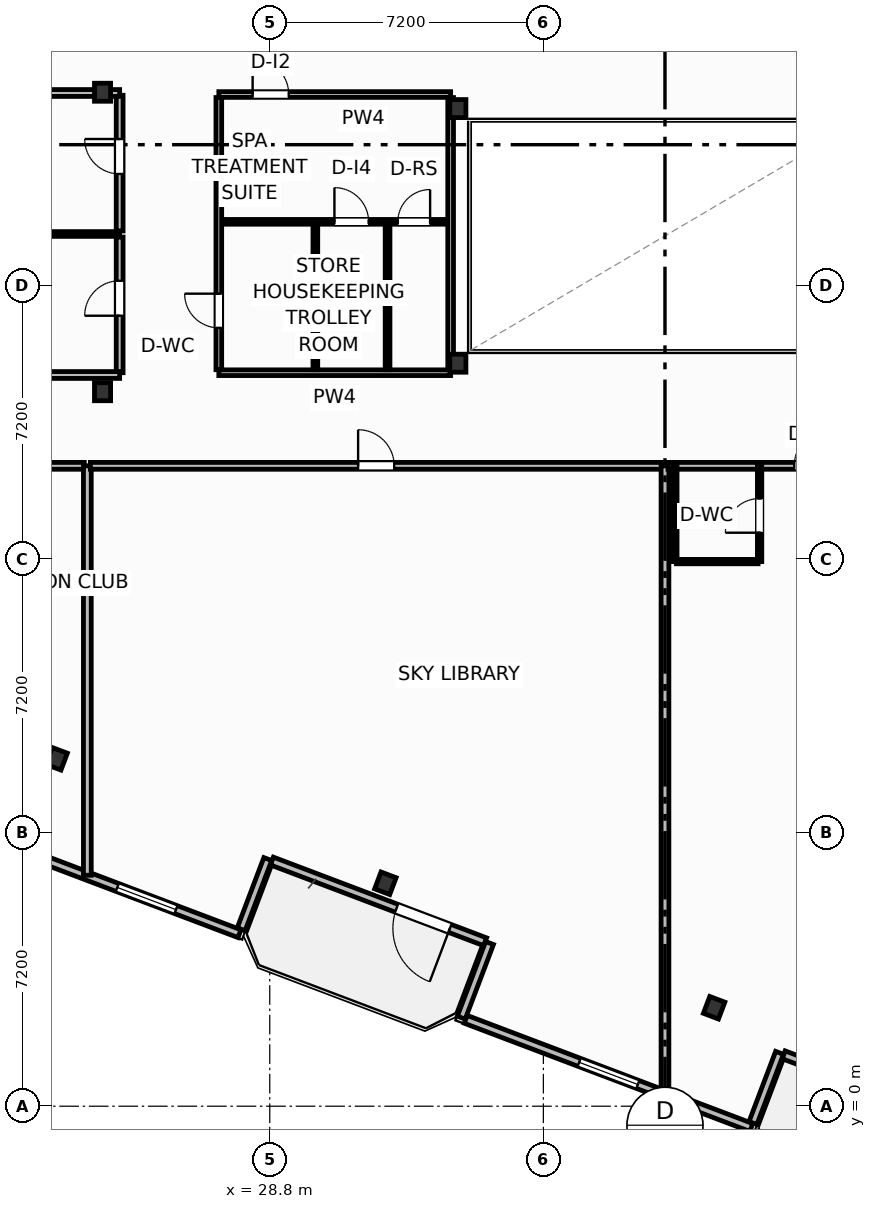
"""IFC4 building model, lengths in metres.
Left out: names, types, materials, properties, quantities, classifications, styles, units other than length and angle.
Written with IfcOpenShell. Run it as: python <this file> out.ifc"""

import sys

from ifc_helpers import new_model, si_unit, direction, frame, frame_2d, origin, origin_2d, place, context, subcontext, project, spatial, rectangle, i_section, extrude, element, fill, save


model = new_model("IFC4")
c1 = context("Model", 3, precision=1e-05, world=origin(), true_north=direction((0.0, 1.0)))
c2 = subcontext(c1, "Body", "Model", "MODEL_VIEW")
j1 = project(units=[si_unit("LENGTHUNIT", "METRE"), si_unit("PLANEANGLEUNIT", "RADIAN")], contexts=[c1])
p1 = place(None, origin())
s1 = spatial("IfcSite", under=j1, at=p1, CompositionType="ELEMENT")
p2 = place(p1, origin())
s2 = spatial("IfcBuilding", under=s1, at=p2, CompositionType="ELEMENT")
p3 = place(p2, frame((0.0, 0.0, 98.4)))
s3 = spatial("IfcBuildingStorey", under=s2, at=p3, CompositionType="ELEMENT", Elevation=98.4)
for number, where, z_axis, x_axis in (
    (1, (33.75, 19.55, 0.0), (0.0, 0.0, 1.0), (1.0, 0.0, 0.0)),
    (2, (33.75, 26.25, 0.0), (0.0, 0.0, 1.0), (1.0, 0.0, 0.0)),
    (3, (24.4, 18.8, 0.0), (0.0, 0.0, 1.0), (1.0, 0.0, 0.0)),
    (4, (24.4, 26.68, 0.0), (0.0, 0.0, 1.0), (1.0, 0.0, 0.0)),
    (5, (23.192, 9.141, 0.0), (0.0, 0.0, 1.0), (0.935, -0.354, 0.0)),
    (6, (31.843, 5.866, 0.0), (0.0, 0.0, 1.0), (0.935, -0.354, 0.0)),
    (7, (40.493, 2.591, 0.0), (0.0, 0.0, 1.0), (0.935, -0.354, 0.0)),
):
    element("IfcColumn", number, at=place(p3, frame(where, z_axis=z_axis, x_axis=x_axis)), inside=s3, PredefinedType="COLUMN", context=c2, shape_type="SweptSolid", body=[
        extrude(i_section(OverallWidth=0.424, OverallDepth=0.474, WebThickness=0.048, FlangeThickness=0.077, FilletRadius=0.025, at=origin_2d()), origin(), (0.0, 0.0, 1.0), 3.7),
    ])
p4 = place(p3, frame((34.468, 4.327, 0.0), z_axis=(0.0, 0.0, 1.0), x_axis=(-0.9352192676, 0.354069091436, 0.0)))
e8 = element("IfcWall", 8, at=p4, inside=s3, PredefinedType="SOLIDWALL", context=c2, shape_type="SweptSolid", body=[
    extrude(rectangle(XDim=6.0, YDim=0.22, at=frame_2d((3.0, 0.0))), origin(), (0.0, 0.0, 1.0), 2.73),
])
p5 = place(p4, frame((0.992, 0.0, 0.0)))
e9 = element("IfcOpeningElement", 9, at=p5, cuts=e8, PredefinedType="OPENING", context=c2, shape_type="SweptSolid", body=[
    extrude(rectangle(XDim=1.5, YDim=2.25, at=frame_2d((0.75, 1.125))), frame((0.0, 0.12, 0.0), z_axis=(0.0, -1.0, 0.0), x_axis=(1.0, 0.0, 0.0)), (0.0, 0.0, 1.0), 0.24),
])
p6 = place(p3, frame((47.935, -0.771, 0.0), z_axis=(0.0, 0.0, 1.0), x_axis=(-0.935227640088, 0.354046976001, 0.0)))
e10 = element("IfcWall", 10, at=p6, inside=s3, PredefinedType="SOLIDWALL", context=c2, shape_type="SweptSolid", body=[
    extrude(rectangle(XDim=6.0, YDim=0.22, at=frame_2d((3.0, 0.0))), origin(), (0.0, 0.0, 1.0), 2.73),
])
p7 = place(p6, frame((2.176, 0.0, 0.0)))
e11 = element("IfcOpeningElement", 11, at=p7, cuts=e10, PredefinedType="OPENING", context=c2, shape_type="SweptSolid", body=[
    extrude(rectangle(XDim=1.5, YDim=2.25, at=frame_2d((0.75, 1.125))), frame((0.0, 0.12, 0.0), z_axis=(0.0, -1.0, 0.0), x_axis=(1.0, 0.0, 0.0)), (0.0, 0.0, 1.0), 0.24),
])
p8 = place(p3, frame((20.49, 7.384, 0.0), z_axis=(0.0, 0.0, 1.0), x_axis=(0.935230796934, -0.354038636968, 0.0)))
e12 = element("IfcWall", 12, at=p8, inside=s3, PredefinedType="SOLIDWALL", context=c2, shape_type="SweptSolid", body=[
    extrude(rectangle(XDim=8.035, YDim=0.22, at=frame_2d((4.018, 0.0))), origin(), (0.0, 0.0, 1.0), 2.73),
])
p9 = place(p8, frame((4.597, 0.0, 0.8)))
e13 = element("IfcOpeningElement", 13, at=p9, cuts=e12, PredefinedType="OPENING", context=c2, shape_type="SweptSolid", body=[
    extrude(rectangle(XDim=1.65, YDim=1.65, at=frame_2d((0.825, 0.825))), frame((0.0, 0.12, 0.0), z_axis=(0.0, -1.0, 0.0), x_axis=(1.0, 0.0, 0.0)), (0.0, 0.0, 1.0), 0.24),
])
p10 = place(p3, frame((28.048, 4.656, 0.0), z_axis=(0.0, 0.0, 1.0), x_axis=(0.354128791944, 0.935196663123, 0.0)))
e14 = element("IfcWall", 14, at=p10, inside=s3, PredefinedType="SOLIDWALL", context=c2, shape_type="SweptSolid", body=[
    extrude(rectangle(XDim=1.975, YDim=0.22, at=frame_2d((0.988, 0.0))), origin(), (0.0, 0.0, 1.0), 2.73),
])
p11 = place(p3, frame((34.583, 4.294, 0.0), z_axis=(0.0, 0.0, 1.0), x_axis=(-0.354128469405, -0.935196785258, 0.0)))
e15 = element("IfcWall", 15, at=p11, inside=s3, PredefinedType="SOLIDWALL", context=c2, shape_type="SweptSolid", body=[
    extrude(rectangle(XDim=2.1, YDim=0.22, at=frame_2d((1.05, 0.0))), origin(), (0.0, 0.0, 1.0), 2.73),
])
p12 = place(p3, frame((33.957, 2.286, 0.0), z_axis=(0.0, 0.0, 1.0), x_axis=(0.935220736163, -0.354065212427, 0.0)))
e16 = element("IfcWall", 16, at=p12, inside=s3, PredefinedType="SOLIDWALL", context=c2, shape_type="SweptSolid", body=[
    extrude(rectangle(XDim=8.035, YDim=0.22, at=frame_2d((4.018, 0.0))), origin(), (0.0, 0.0, 1.0), 2.73),
])
p13 = place(p12, frame((3.192, 0.0, 0.8)))
e17 = element("IfcOpeningElement", 17, at=p13, cuts=e16, PredefinedType="OPENING", context=c2, shape_type="SweptSolid", body=[
    extrude(rectangle(XDim=1.65, YDim=1.65, at=frame_2d((0.825, 0.825))), frame((0.0, 0.12, 0.0), z_axis=(0.0, -1.0, 0.0), x_axis=(1.0, 0.0, 0.0)), (0.0, 0.0, 1.0), 0.24),
])
p14 = place(p3, frame((41.516, -0.442, 0.0), z_axis=(0.0, 0.0, 1.0), x_axis=(0.354061611705, 0.935222099352, 0.0)))
e18 = element("IfcWall", 18, at=p14, inside=s3, PredefinedType="SOLIDWALL", context=c2, shape_type="SweptSolid", body=[
    extrude(rectangle(XDim=1.975, YDim=0.22, at=frame_2d((0.987, 0.0))), origin(), (0.0, 0.0, 1.0), 2.73),
])
p15 = place(p3, frame((1.58, 16.85, 0.0), z_axis=(0.0, 0.0, 1.0), x_axis=(1.0, 0.0, 0.0)))
e19 = element("IfcWall", 19, at=p15, inside=s3, PredefinedType="PARTITIONING", context=c2, shape_type="SweptSolid", body=[
    extrude(rectangle(XDim=22.34, YDim=0.18, at=frame_2d((11.17, 0.0))), origin(), (0.0, 0.0, 1.0), 3.45),
])
p16 = place(p15, frame((14.895, 0.0, 0.0)))
e20 = element("IfcOpeningElement", 20, at=p16, cuts=e19, PredefinedType="OPENING", context=c2, shape_type="SweptSolid", body=[
    extrude(rectangle(XDim=0.95, YDim=2.05, at=frame_2d((0.475, 1.025))), frame((0.0, 0.1, 0.0), z_axis=(0.0, -1.0, 0.0), x_axis=(1.0, 0.0, 0.0)), (0.0, 0.0, 1.0), 0.2),
])
p17 = place(p3, frame((24.0, 6.076, 0.0), z_axis=(0.0, 0.0, 1.0), x_axis=(0.0, 1.0, 0.0)))
e21 = element("IfcWall", 21, at=p17, inside=s3, PredefinedType="PARTITIONING", context=c2, shape_type="SweptSolid", body=[
    extrude(rectangle(XDim=10.774, YDim=0.205, at=frame_2d((5.387, 0.0))), origin(), (0.0, 0.0, 1.0), 2.58),
])
p18 = place(p3, frame((24.08, 16.85, 0.0), z_axis=(0.0, 0.0, 1.0), x_axis=(1.0, 0.0, 0.0)))
e22 = element("IfcWall", 22, at=p18, inside=s3, PredefinedType="PARTITIONING", context=c2, shape_type="SweptSolid", body=[
    extrude(rectangle(XDim=15.04, YDim=0.18, at=frame_2d((7.52, 0.0))), origin(), (0.0, 0.0, 1.0), 3.45),
])
p19 = place(p18, frame((7.045, 0.0, 0.0)))
e23 = element("IfcOpeningElement", 23, at=p19, cuts=e22, PredefinedType="OPENING", context=c2, shape_type="SweptSolid", body=[
    extrude(rectangle(XDim=0.95, YDim=2.05, at=frame_2d((0.475, 1.025))), frame((0.0, 0.1, 0.0), z_axis=(0.0, -1.0, 0.0), x_axis=(1.0, 0.0, 0.0)), (0.0, 0.0, 1.0), 0.2),
])
p20 = place(p3, frame((39.2, 0.322, 0.0), z_axis=(0.0, 0.0, 1.0), x_axis=(0.0, 1.0, 0.0)))
e24 = element("IfcWall", 24, at=p20, inside=s3, PredefinedType="PARTITIONING", context=c2, shape_type="SweptSolid", body=[
    extrude(rectangle(XDim=16.528, YDim=0.205, at=frame_2d((8.264, 0.0))), origin(), (0.0, 0.0, 1.0), 3.45),
])
p21 = place(p3, frame((39.28, 16.85, 0.0), z_axis=(0.0, 0.0, 1.0), x_axis=(1.0, 0.0, 0.0)))
e25 = element("IfcWall", 25, at=p21, inside=s3, PredefinedType="PARTITIONING", context=c2, shape_type="SweptSolid", body=[
    extrude(rectangle(XDim=14.64, YDim=0.18, at=frame_2d((7.32, 0.0))), origin(), (0.0, 0.0, 1.0), 3.45),
])
p22 = place(p21, frame((3.322, 0.0, 0.0)))
e26 = element("IfcOpeningElement", 26, at=p22, cuts=e25, PredefinedType="OPENING", context=c2, shape_type="SweptSolid", body=[
    extrude(rectangle(XDim=0.95, YDim=2.15, at=frame_2d((0.475, 1.075))), frame((0.0, 0.1, 0.0), z_axis=(0.0, -1.0, 0.0), x_axis=(1.0, 0.0, 0.0)), (0.0, 0.0, 1.0), 0.2),
])
p23 = place(p3, frame((39.5, 14.33, 0.0), z_axis=(0.0, 0.0, 1.0), x_axis=(1.0, 0.0, 0.0)))
e27 = element("IfcWall", 27, at=p23, inside=s3, PredefinedType="PARTITIONING", context=c2, shape_type="SweptSolid", body=[
    extrude(rectangle(XDim=2.15, YDim=0.115, at=frame_2d((1.075, 0.0))), origin(), (0.0, 0.0, 1.0), 3.45),
])
p24 = place(p3, frame((41.69, 14.33, 0.0), z_axis=(0.0, 0.0, 1.0), x_axis=(0.0, 1.0, 0.0)))
e28 = element("IfcWall", 28, at=p24, inside=s3, PredefinedType="PARTITIONING", context=c2, shape_type="SweptSolid", body=[
    extrude(rectangle(XDim=2.52, YDim=0.115, at=frame_2d((1.26, 0.0))), origin(), (0.0, 0.0, 1.0), 3.45),
])
p25 = place(p24, frame((0.76, 0.0, 0.0)))
e29 = element("IfcOpeningElement", 29, at=p25, cuts=e28, PredefinedType="OPENING", context=c2, shape_type="SweptSolid", body=[
    extrude(rectangle(XDim=0.9, YDim=2.05, at=frame_2d((0.45, 1.025))), frame((0.0, 0.067, 0.0), z_axis=(0.0, -1.0, 0.0), x_axis=(1.0, 0.0, 0.0)), (0.0, 0.0, 1.0), 0.135),
])
p26 = place(p3, frame((39.46, 14.33, 0.0), z_axis=(0.0, 0.0, 1.0), x_axis=(0.0, 1.0, 0.0)))
e30 = element("IfcWall", 30, at=p26, inside=s3, PredefinedType="PARTITIONING", context=c2, shape_type="SweptSolid", body=[
    extrude(rectangle(XDim=2.52, YDim=0.115, at=frame_2d((1.26, 0.0))), origin(), (0.0, 0.0, 1.0), 3.45),
])
p27 = place(p3, frame((24.85, 19.3, 0.0), z_axis=(0.0, 0.0, 1.0), x_axis=(0.0, 1.0, 0.0)))
e31 = element("IfcWall", 31, at=p27, inside=s3, PredefinedType="PARTITIONING", context=c2, shape_type="SweptSolid", body=[
    extrude(rectangle(XDim=3.57, YDim=0.18, at=frame_2d((1.785, 0.0))), origin(), (0.0, 0.0, 1.0), 3.45),
])
p28 = place(p27, frame((1.5, 0.0, 0.0)))
e32 = element("IfcOpeningElement", 32, at=p28, cuts=e31, PredefinedType="OPENING", context=c2, shape_type="SweptSolid", body=[
    extrude(rectangle(XDim=0.92, YDim=2.05, at=frame_2d((0.46, 1.025))), frame((0.0, 0.1, 0.0), z_axis=(0.0, -1.0, 0.0), x_axis=(1.0, 0.0, 0.0)), (0.0, 0.0, 1.0), 0.2),
])
p29 = place(p3, frame((24.85, 23.03, 0.0), z_axis=(0.0, 0.0, 1.0), x_axis=(0.0, 1.0, 0.0)))
e33 = element("IfcWall", 33, at=p29, inside=s3, PredefinedType="PARTITIONING", context=c2, shape_type="SweptSolid", body=[
    extrude(rectangle(XDim=3.57, YDim=0.18, at=frame_2d((1.785, 0.0))), origin(), (0.0, 0.0, 1.0), 3.45),
])
p30 = place(p29, frame((1.5, 0.0, 0.0)))
e34 = element("IfcOpeningElement", 34, at=p30, cuts=e33, PredefinedType="OPENING", context=c2, shape_type="SweptSolid", body=[
    extrude(rectangle(XDim=0.92, YDim=2.05, at=frame_2d((0.46, 1.025))), frame((0.0, 0.1, 0.0), z_axis=(0.0, -1.0, 0.0), x_axis=(1.0, 0.0, 0.0)), (0.0, 0.0, 1.0), 0.2),
])
p31 = place(p3, frame((1.0, 22.95, 0.0), z_axis=(0.0, 0.0, 1.0), x_axis=(1.0, 0.0, 0.0)))
e35 = element("IfcWall", 35, at=p31, inside=s3, PredefinedType="PARTITIONING", context=c2, shape_type="SweptSolid", body=[
    extrude(rectangle(XDim=23.85, YDim=0.125, at=frame_2d((11.925, 0.0))), origin(), (0.0, 0.0, 1.0), 3.45),
])
p32 = place(p3, frame((0.2, 19.24, 0.0), z_axis=(0.0, 0.0, 1.0), x_axis=(1.0, 0.0, 0.0)))
e36 = element("IfcWall", 36, at=p32, inside=s3, PredefinedType="PARTITIONING", context=c2, shape_type="SweptSolid", body=[
    extrude(rectangle(XDim=24.65, YDim=0.18, at=frame_2d((12.325, 0.0))), origin(), (0.0, 0.0, 1.0), 3.45),
])
p33 = place(p3, frame((-0.086, 26.66, 0.0), z_axis=(0.0, 0.0, 1.0), x_axis=(1.0, 0.0, 0.0)))
e37 = element("IfcWall", 37, at=p33, inside=s3, PredefinedType="PARTITIONING", context=c2, shape_type="SweptSolid", body=[
    extrude(rectangle(XDim=24.936, YDim=0.18, at=frame_2d((12.468, 0.0))), origin(), (0.0, 0.0, 1.0), 2.662),
])
p34 = place(p3, frame((27.46, 26.62, 0.0), z_axis=(0.0, 0.0, 1.0), x_axis=(1.0, 0.0, 0.0)))
e38 = element("IfcWall", 38, at=p34, inside=s3, PredefinedType="PARTITIONING", context=c2, shape_type="SweptSolid", body=[
    extrude(rectangle(XDim=6.1, YDim=0.15, at=frame_2d((3.05, 0.0))), origin(), (0.0, 0.0, 1.0), 2.662),
])
p35 = place(p34, frame((0.89, 0.0, 0.0)))
e39 = element("IfcOpeningElement", 39, at=p35, cuts=e38, PredefinedType="OPENING", context=c2, shape_type="SweptSolid", body=[
    extrude(rectangle(XDim=0.95, YDim=2.05, at=frame_2d((0.475, 1.025))), frame((0.0, 0.085, 0.0), z_axis=(0.0, -1.0, 0.0), x_axis=(1.0, 0.0, 0.0)), (0.0, 0.0, 1.0), 0.17),
])
p36 = place(p3, frame((27.46, 19.3, 0.0), z_axis=(0.0, 0.0, 1.0), x_axis=(1.0, 0.0, 0.0)))
e40 = element("IfcWall", 40, at=p36, inside=s3, PredefinedType="PARTITIONING", context=c2, shape_type="SweptSolid", body=[
    extrude(rectangle(XDim=6.1, YDim=0.15, at=frame_2d((3.05, 0.0))), origin(), (0.0, 0.0, 1.0), 2.662),
])
p37 = place(p3, frame((27.52, 23.27, 0.0), z_axis=(0.0, 0.0, 1.0), x_axis=(1.0, 0.0, 0.0)))
e41 = element("IfcWall", 41, at=p37, inside=s3, PredefinedType="PARTITIONING", context=c2, shape_type="SweptSolid", body=[
    extrude(rectangle(XDim=6.0, YDim=0.125, at=frame_2d((3.0, 0.0))), origin(), (0.0, 0.0, 1.0), 3.45),
])
p38 = place(p37, frame((2.982, 0.0, 0.0)))
e42 = element("IfcOpeningElement", 42, at=p38, cuts=e41, PredefinedType="OPENING", context=c2, shape_type="SweptSolid", body=[
    extrude(rectangle(XDim=0.9, YDim=2.05, at=frame_2d((0.45, 1.025))), frame((0.0, 0.073, 0.0), z_axis=(0.0, -1.0, 0.0), x_axis=(1.0, 0.0, 0.0)), (0.0, 0.0, 1.0), 0.145),
])
p39 = place(p37, frame((4.65, 0.0, 0.0)))
e43 = element("IfcOpeningElement", 43, at=p39, cuts=e41, PredefinedType="OPENING", context=c2, shape_type="SweptSolid", body=[
    extrude(rectangle(XDim=0.85, YDim=2.05, at=frame_2d((0.425, 1.025))), frame((0.0, 0.073, 0.0), z_axis=(0.0, -1.0, 0.0), x_axis=(1.0, 0.0, 0.0)), (0.0, 0.0, 1.0), 0.145),
])
for number, where, z_axis, x_axis in (
    (44, (30.0, 19.38, 0.0), (0.0, 0.0, 1.0), (0.0, 1.0, 0.0)),
    (45, (31.9, 19.38, 0.0), (0.0, 0.0, 1.0), (0.0, 1.0, 0.0)),
):
    element("IfcWall", number, at=place(p3, frame(where, z_axis=z_axis, x_axis=x_axis)), inside=s3, PredefinedType="PARTITIONING", context=c2, shape_type="SweptSolid", body=[
        extrude(rectangle(XDim=3.82, YDim=0.125, at=frame_2d((1.91, 0.0))), origin(), (0.0, 0.0, 1.0), 3.45),
    ])
p40 = place(p3, frame((27.46, 19.38, 0.0), z_axis=(0.0, 0.0, 1.0), x_axis=(0.0, 1.0, 0.0)))
e46 = element("IfcWall", 46, at=p40, inside=s3, PredefinedType="PARTITIONING", context=c2, shape_type="SweptSolid", body=[
    extrude(rectangle(XDim=7.16, YDim=0.15, at=frame_2d((3.58, 0.0))), origin(), (0.0, 0.0, 1.0), 3.45),
])
p41 = place(p40, frame((1.1, 0.0, 0.0)))
e47 = element("IfcOpeningElement", 47, at=p41, cuts=e46, PredefinedType="OPENING", context=c2, shape_type="SweptSolid", body=[
    extrude(rectangle(XDim=0.9, YDim=2.05, at=frame_2d((0.45, 1.025))), frame((0.0, 0.085, 0.0), z_axis=(0.0, -1.0, 0.0), x_axis=(1.0, 0.0, 0.0)), (0.0, 0.0, 1.0), 0.17),
])
p42 = place(p3, frame((33.56, 19.38, 0.0), z_axis=(0.0, 0.0, 1.0), x_axis=(0.0, 1.0, 0.0)))
e48 = element("IfcWall", 48, at=p42, inside=s3, PredefinedType="PARTITIONING", context=c2, shape_type="SweptSolid", body=[
    extrude(rectangle(XDim=7.16, YDim=0.15, at=frame_2d((3.58, 0.0))), origin(), (0.0, 0.0, 1.0), 2.824),
])
p43 = place(p5, origin())
e49 = element("IfcDoor", 49, at=p43, inside=s3, OperationType="SINGLE_SWING_LEFT", PredefinedType="DOOR", context=c2, shape_type="SweptSolid", body=[
    extrude(rectangle(XDim=1.5, YDim=2.25, at=frame_2d((0.75, 1.125))), frame((0.0, 0.025, 0.0), z_axis=(0.0, -1.0, 0.0), x_axis=(1.0, 0.0, 0.0)), (0.0, 0.0, 1.0), 0.05),
])
fill(e9, e49)
p44 = place(p9, origin())
e50 = element("IfcWindow", 50, at=p44, inside=s3, PartitioningType="SINGLE_PANEL", PredefinedType="WINDOW", context=c2, shape_type="SweptSolid", body=[
    extrude(rectangle(XDim=1.65, YDim=1.65, at=frame_2d((0.825, 0.825))), frame((0.0, 0.03, 0.0), z_axis=(0.0, -1.0, 0.0), x_axis=(1.0, 0.0, 0.0)), (0.0, 0.0, 1.0), 0.06),
])
fill(e13, e50)
p45 = place(p13, origin())
e51 = element("IfcWindow", 51, at=p45, inside=s3, PartitioningType="SINGLE_PANEL", PredefinedType="WINDOW", context=c2, shape_type="SweptSolid", body=[
    extrude(rectangle(XDim=1.65, YDim=1.65, at=frame_2d((0.825, 0.825))), frame((0.0, 0.03, 0.0), z_axis=(0.0, -1.0, 0.0), x_axis=(1.0, 0.0, 0.0)), (0.0, 0.0, 1.0), 0.06),
])
fill(e17, e51)
p46 = place(p19, origin())
e52 = element("IfcDoor", 52, at=p46, inside=s3, OperationType="SINGLE_SWING_LEFT", PredefinedType="DOOR", context=c2, shape_type="SweptSolid", body=[
    extrude(rectangle(XDim=0.95, YDim=2.05, at=frame_2d((0.475, 1.025))), frame((0.0, 0.025, 0.0), z_axis=(0.0, -1.0, 0.0), x_axis=(1.0, 0.0, 0.0)), (0.0, 0.0, 1.0), 0.05),
])
fill(e23, e52)
p47 = place(p22, origin())
e53 = element("IfcDoor", 53, at=p47, inside=s3, OperationType="SINGLE_SWING_RIGHT", PredefinedType="DOOR", context=c2, shape_type="SweptSolid", body=[
    extrude(rectangle(XDim=0.95, YDim=2.15, at=frame_2d((0.475, 1.075))), frame((0.0, 0.025, 0.0), z_axis=(0.0, -1.0, 0.0), x_axis=(1.0, 0.0, 0.0)), (0.0, 0.0, 1.0), 0.05),
])
fill(e26, e53)
p48 = place(p25, origin())
e54 = element("IfcDoor", 54, at=p48, inside=s3, OperationType="SINGLE_SWING_LEFT", PredefinedType="DOOR", context=c2, shape_type="SweptSolid", body=[
    extrude(rectangle(XDim=0.9, YDim=2.05, at=frame_2d((0.45, 1.025))), frame((0.0, 0.025, 0.0), z_axis=(0.0, -1.0, 0.0), x_axis=(1.0, 0.0, 0.0)), (0.0, 0.0, 1.0), 0.05),
])
fill(e29, e54)
p49 = place(p28, origin())
e55 = element("IfcDoor", 55, at=p49, inside=s3, OperationType="SINGLE_SWING_LEFT", PredefinedType="DOOR", context=c2, shape_type="SweptSolid", body=[
    extrude(rectangle(XDim=0.92, YDim=2.05, at=frame_2d((0.46, 1.025))), frame((0.0, 0.025, 0.0), z_axis=(0.0, -1.0, 0.0), x_axis=(1.0, 0.0, 0.0)), (0.0, 0.0, 1.0), 0.05),
])
fill(e32, e55)
p50 = place(p30, origin())
e56 = element("IfcDoor", 56, at=p50, inside=s3, OperationType="SINGLE_SWING_RIGHT", PredefinedType="DOOR", context=c2, shape_type="SweptSolid", body=[
    extrude(rectangle(XDim=0.92, YDim=2.05, at=frame_2d((0.46, 1.025))), frame((0.0, 0.025, 0.0), z_axis=(0.0, -1.0, 0.0), x_axis=(1.0, 0.0, 0.0)), (0.0, 0.0, 1.0), 0.05),
])
fill(e34, e56)
p51 = place(p35, origin())
e57 = element("IfcDoor", 57, at=p51, inside=s3, OperationType="SINGLE_SWING_LEFT", PredefinedType="DOOR", context=c2, shape_type="SweptSolid", body=[
    extrude(rectangle(XDim=0.95, YDim=2.05, at=frame_2d((0.475, 1.025))), frame((0.0, 0.025, 0.0), z_axis=(0.0, -1.0, 0.0), x_axis=(1.0, 0.0, 0.0)), (0.0, 0.0, 1.0), 0.05),
])
fill(e39, e57)
p52 = place(p38, origin())
e58 = element("IfcDoor", 58, at=p52, inside=s3, OperationType="SINGLE_SWING_LEFT", PredefinedType="DOOR", context=c2, shape_type="SweptSolid", body=[
    extrude(rectangle(XDim=0.9, YDim=2.05, at=frame_2d((0.45, 1.025))), frame((0.0, 0.025, 0.0), z_axis=(0.0, -1.0, 0.0), x_axis=(1.0, 0.0, 0.0)), (0.0, 0.0, 1.0), 0.05),
])
fill(e42, e58)
p53 = place(p39, origin())
e59 = element("IfcDoor", 59, at=p53, inside=s3, OperationType="SINGLE_SWING_RIGHT", PredefinedType="DOOR", context=c2, shape_type="SweptSolid", body=[
    extrude(rectangle(XDim=0.85, YDim=2.05, at=frame_2d((0.425, 1.025))), frame((0.0, 0.025, 0.0), z_axis=(0.0, -1.0, 0.0), x_axis=(1.0, 0.0, 0.0)), (0.0, 0.0, 1.0), 0.05),
])
fill(e43, e59)
p54 = place(p41, origin())
e60 = element("IfcDoor", 60, at=p54, inside=s3, OperationType="SINGLE_SWING_RIGHT", PredefinedType="DOOR", context=c2, shape_type="SweptSolid", body=[
    extrude(rectangle(XDim=0.9, YDim=2.05, at=frame_2d((0.45, 1.025))), frame((0.0, 0.025, 0.0), z_axis=(0.0, -1.0, 0.0), x_axis=(1.0, 0.0, 0.0)), (0.0, 0.0, 1.0), 0.05),
])
fill(e47, e60)
save(model, sys.argv[1])
